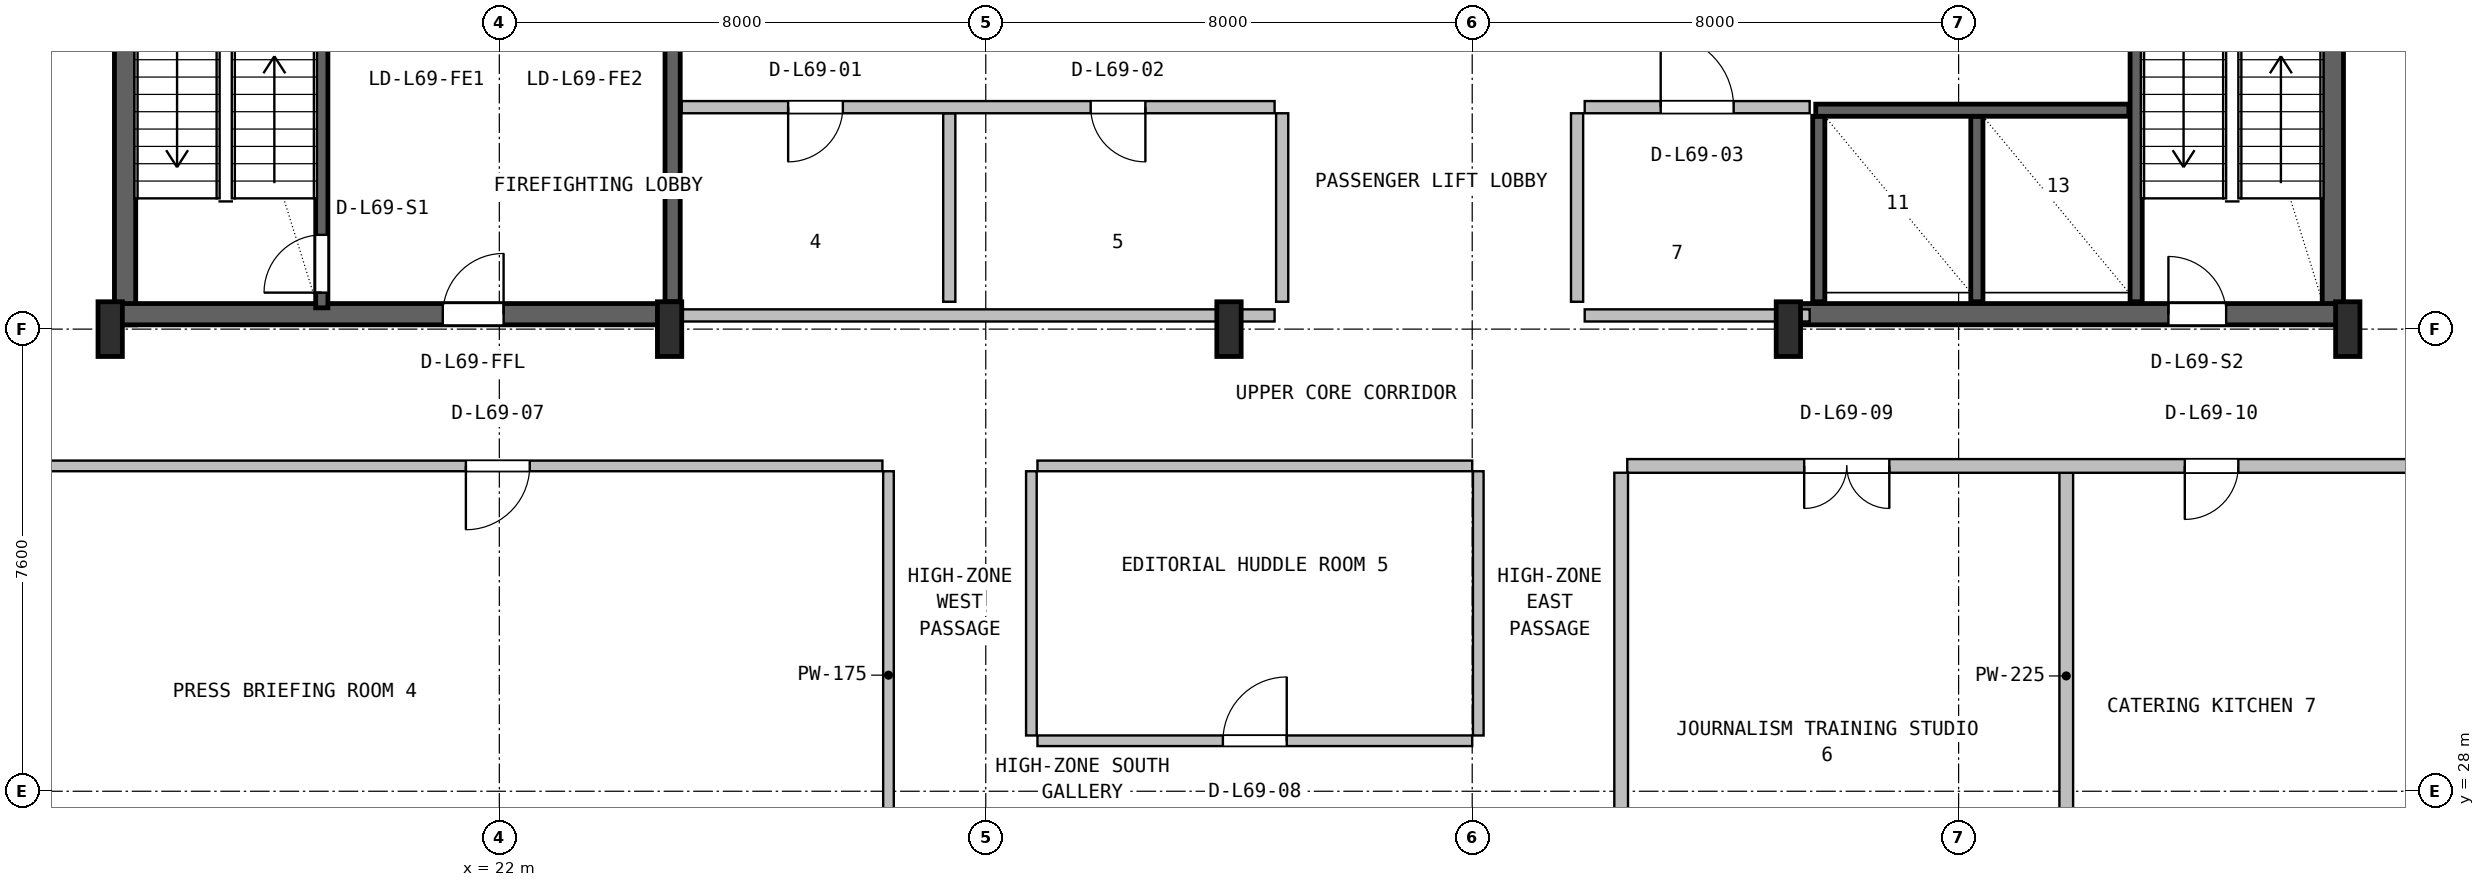
"""IFC4 building model, lengths in metres.
Left out: names, types, materials, properties, quantities, classifications, styles, units other than length and angle.
Written with IfcOpenShell. Run it as: python <this file> out.ifc"""

import sys

from ifc_helpers import new_model, si_unit, direction, frame, frame_2d, origin, origin_2d, place, context, subcontext, project, spatial, rectangle, i_section, extrude, source, transform, mapped, element, fill, save


model = new_model("IFC4")
c1 = context("Model", 3, precision=1e-05, world=origin(), true_north=direction((0.0, 1.0)))
c2 = subcontext(c1, "Body", "Model", "MODEL_VIEW")
j1 = project(units=[si_unit("LENGTHUNIT", "METRE"), si_unit("PLANEANGLEUNIT", "RADIAN")], contexts=[c1])
p1 = place(None, origin())
s1 = spatial("IfcSite", under=j1, at=p1, CompositionType="ELEMENT")
p2 = place(p1, origin())
s2 = spatial("IfcBuilding", under=s1, at=p2, CompositionType="ELEMENT")
p3 = place(p2, frame((0.0, 0.0, 277.4)))
s3 = spatial("IfcBuildingStorey", under=s2, at=p3, CompositionType="ELEMENT", Elevation=277.4)
for number, where, z_axis, x_axis in (
    (1, (15.845, 35.67, 0.0), (0.0, 0.0, 1.0), (0.0, 1.0, 0.0)),
    (2, (52.155, 35.67, 0.0), (0.0, 0.0, 1.0), (0.0, 1.0, 0.0)),
):
    element("IfcWall", number, at=place(p3, frame(where, z_axis=z_axis, x_axis=x_axis)), inside=s3, PredefinedType="SHEAR", context=c2, shape_type="SweptSolid", body=[
        extrude(rectangle(XDim=11.13, YDim=0.35, at=frame_2d((5.565, 0.0))), origin(), (0.0, 0.0, 1.0), 3.55),
    ])
p4 = place(p3, frame((15.67, 35.845, 0.0), z_axis=(0.0, 0.0, 1.0), x_axis=(1.0, 0.0, 0.0)))
e3 = element("IfcWall", 3, at=p4, inside=s3, PredefinedType="SHEAR", context=c2, shape_type="SweptSolid", body=[
    extrude(rectangle(XDim=9.13, YDim=0.35, at=frame_2d((4.565, 0.0))), origin(), (0.0, 0.0, 1.0), 3.55),
])
p5 = place(p4, frame((5.4, 0.0, 0.0)))
e4 = element("IfcOpeningElement", 4, at=p5, cuts=e3, PredefinedType="OPENING", context=c2, shape_type="SweptSolid", body=[
    extrude(rectangle(XDim=1.0, YDim=2.1, at=frame_2d((0.5, 1.05))), frame((0.0, 0.185, 0.0), z_axis=(0.0, -1.0, 0.0), x_axis=(1.0, 0.0, 0.0)), (0.0, 0.0, 1.0), 0.37),
])
p6 = place(p3, frame((43.2, 35.845, 0.0), z_axis=(0.0, 0.0, 1.0), x_axis=(1.0, 0.0, 0.0)))
e5 = element("IfcWall", 5, at=p6, inside=s3, PredefinedType="SHEAR", context=c2, shape_type="SweptSolid", body=[
    extrude(rectangle(XDim=9.13, YDim=0.35, at=frame_2d((4.565, 0.0))), origin(), (0.0, 0.0, 1.0), 3.55),
])
p7 = place(p6, frame((6.25, 0.0, 0.0)))
e6 = element("IfcOpeningElement", 6, at=p7, cuts=e5, PredefinedType="OPENING", context=c2, shape_type="SweptSolid", body=[
    extrude(rectangle(XDim=0.95, YDim=2.1, at=frame_2d((0.475, 1.05))), frame((0.0, 0.185, 0.0), z_axis=(0.0, -1.0, 0.0), x_axis=(1.0, 0.0, 0.0)), (0.0, 0.0, 1.0), 0.37),
])
m1 = source(origin(), c2, "Body", "SweptSolid", [
    extrude(i_section(OverallWidth=0.4, OverallDepth=0.9, WebThickness=0.016, FlangeThickness=0.028, FilletRadius=0.016, at=origin_2d()), origin(), (0.0, 0.0, 1.0), 3.8),
])
for number, where, z_axis, x_axis in (
    (7, (15.6, 35.6, 0.0), (0.0, 0.0, 1.0), (1.0, 0.0, 0.0)),
    (8, (24.8, 35.6, 0.0), (0.0, 0.0, 1.0), (1.0, 0.0, 0.0)),
    (9, (34.0, 35.6, 0.0), (0.0, 0.0, 1.0), (1.0, 0.0, 0.0)),
    (10, (43.2, 35.6, 0.0), (0.0, 0.0, 1.0), (1.0, 0.0, 0.0)),
    (11, (52.4, 35.6, 0.0), (0.0, 0.0, 1.0), (1.0, 0.0, 0.0)),
):
    element("IfcColumn", number, at=place(p3, frame(where, z_axis=z_axis, x_axis=x_axis)), inside=s3, PredefinedType="COLUMN", context=c2, shape_type="MappedRepresentation", body=[
        mapped(m1, transform((0.0, 0.0, 0.0), x_axis=(1.0, 0.0, 0.0), y_axis=(0.0, 1.0, 0.0), z_axis=(0.0, 0.0, 1.0), scale=1.0)),
    ])
p8 = place(p3, frame((19.08, 35.95, 0.0), z_axis=(0.0, 0.0, 1.0), x_axis=(0.0, 1.0, 0.0)))
e12 = element("IfcWall", 12, at=p8, inside=s3, PredefinedType="SHEAR", context=c2, shape_type="SweptSolid", body=[
    extrude(rectangle(XDim=9.65, YDim=0.2, at=frame_2d((4.825, 0.0))), origin(), (0.0, 0.0, 1.0), 3.55),
])
p9 = place(p8, frame((0.25, 0.0, 0.0)))
e13 = element("IfcOpeningElement", 13, at=p9, cuts=e12, PredefinedType="OPENING", context=c2, shape_type="SweptSolid", body=[
    extrude(rectangle(XDim=0.95, YDim=2.1, at=frame_2d((0.475, 1.05))), frame((0.0, 0.11, 0.0), z_axis=(0.0, -1.0, 0.0), x_axis=(1.0, 0.0, 0.0)), (0.0, 0.0, 1.0), 0.22),
])
p10 = place(p3, frame((24.85, 36.05, 0.0), z_axis=(0.0, 0.0, 1.0), x_axis=(0.0, 1.0, 0.0)))
e14 = element("IfcWall", 14, at=p10, inside=s3, PredefinedType="SHEAR", context=c2, shape_type="SweptSolid", body=[
    extrude(rectangle(XDim=10.45, YDim=0.25, at=frame_2d((5.225, 0.0))), origin(), (0.0, 0.0, 1.0), 3.55),
])
p11 = place(p3, frame((48.92, 36.05, 0.0), z_axis=(0.0, 0.0, 1.0), x_axis=(0.0, 1.0, 0.0)))
e15 = element("IfcWall", 15, at=p11, inside=s3, PredefinedType="SHEAR", context=c2, shape_type="SweptSolid", body=[
    extrude(rectangle(XDim=10.5, YDim=0.2, at=frame_2d((5.25, 0.0))), origin(), (0.0, 0.0, 1.0), 3.55),
])
for number, where, z_axis, x_axis in (
    (16, (43.7, 36.05, 0.0), (0.0, 0.0, 1.0), (0.0, 1.0, 0.0)),
    (17, (46.3, 36.05, 0.0), (0.0, 0.0, 1.0), (0.0, 1.0, 0.0)),
):
    element("IfcWall", number, at=place(p3, frame(where, z_axis=z_axis, x_axis=x_axis)), inside=s3, PredefinedType="SHEAR", context=c2, shape_type="SweptSolid", body=[
        extrude(rectangle(XDim=3.05, YDim=0.2, at=frame_2d((1.525, 0.0))), origin(), (0.0, 0.0, 1.0), 3.55),
    ])
p12 = place(p3, frame((43.65, 39.2, 0.0), z_axis=(0.0, 0.0, 1.0), x_axis=(1.0, 0.0, 0.0)))
e18 = element("IfcWall", 18, at=p12, inside=s3, PredefinedType="SHEAR", context=c2, shape_type="SweptSolid", body=[
    extrude(rectangle(XDim=5.15, YDim=0.2, at=frame_2d((2.575, 0.0))), origin(), (0.0, 0.0, 1.0), 3.55),
])
p13 = place(p3, frame((25.0, 35.825, 0.0), z_axis=(0.0, 0.0, 1.0), x_axis=(1.0, 0.0, 0.0)))
e19 = element("IfcWall", 19, at=p13, inside=s3, PredefinedType="PLUMBINGWALL", context=c2, shape_type="SweptSolid", body=[
    extrude(rectangle(XDim=9.75, YDim=0.2, at=frame_2d((4.875, 0.0))), origin(), (0.0, 0.0, 1.0), 2.575),
])
p14 = place(p3, frame((29.4, 36.05, 0.0), z_axis=(0.0, 0.0, 1.0), x_axis=(0.0, 1.0, 0.0)))
e20 = element("IfcWall", 20, at=p14, inside=s3, PredefinedType="PLUMBINGWALL", context=c2, shape_type="SweptSolid", body=[
    extrude(rectangle(XDim=3.1, YDim=0.2, at=frame_2d((1.55, 0.0))), origin(), (0.0, 0.0, 1.0), 3.53),
])
p15 = place(p3, frame((25.0, 39.25, 0.0), z_axis=(0.0, 0.0, 1.0), x_axis=(1.0, 0.0, 0.0)))
e21 = element("IfcWall", 21, at=p15, inside=s3, PredefinedType="PLUMBINGWALL", context=c2, shape_type="SweptSolid", body=[
    extrude(rectangle(XDim=9.75, YDim=0.2, at=frame_2d((4.875, 0.0))), origin(), (0.0, 0.0, 1.0), 3.53),
])
p16 = place(p15, frame((1.75, 0.0, 0.0)))
e22 = element("IfcOpeningElement", 22, at=p16, cuts=e21, PredefinedType="OPENING", context=c2, shape_type="SweptSolid", body=[
    extrude(rectangle(XDim=0.9, YDim=2.06, at=frame_2d((0.45, 1.03))), frame((0.0, 0.11, 0.0), z_axis=(0.0, -1.0, 0.0), x_axis=(1.0, 0.0, 0.0)), (0.0, 0.0, 1.0), 0.22),
])
p17 = place(p15, frame((6.725, 0.0, 0.0)))
e23 = element("IfcOpeningElement", 23, at=p17, cuts=e21, PredefinedType="OPENING", context=c2, shape_type="SweptSolid", body=[
    extrude(rectangle(XDim=0.9, YDim=2.06, at=frame_2d((0.45, 1.03))), frame((0.0, 0.11, 0.0), z_axis=(0.0, -1.0, 0.0), x_axis=(1.0, 0.0, 0.0)), (0.0, 0.0, 1.0), 0.22),
])
p18 = place(p3, frame((34.875, 36.05, 0.0), z_axis=(0.0, 0.0, 1.0), x_axis=(0.0, 1.0, 0.0)))
e24 = element("IfcWall", 24, at=p18, inside=s3, PredefinedType="PLUMBINGWALL", context=c2, shape_type="SweptSolid", body=[
    extrude(rectangle(XDim=3.1, YDim=0.2, at=frame_2d((1.55, 0.0))), origin(), (0.0, 0.0, 1.0), 3.53),
])
p19 = place(p3, frame((39.85, 35.825, 0.0), z_axis=(0.0, 0.0, 1.0), x_axis=(1.0, 0.0, 0.0)))
e25 = element("IfcWall", 25, at=p19, inside=s3, PredefinedType="SOLIDWALL", context=c2, shape_type="SweptSolid", body=[
    extrude(rectangle(XDim=3.7, YDim=0.2, at=frame_2d((1.85, 0.0))), origin(), (0.0, 0.0, 1.0), 2.575),
])
p20 = place(p3, frame((39.85, 39.25, 0.0), z_axis=(0.0, 0.0, 1.0), x_axis=(1.0, 0.0, 0.0)))
e26 = element("IfcWall", 26, at=p20, inside=s3, PredefinedType="SOLIDWALL", context=c2, shape_type="SweptSolid", body=[
    extrude(rectangle(XDim=3.7, YDim=0.2, at=frame_2d((1.85, 0.0))), origin(), (0.0, 0.0, 1.0), 3.53),
])
p21 = place(p20, frame((1.25, 0.0, 0.0)))
e27 = element("IfcOpeningElement", 27, at=p21, cuts=e26, PredefinedType="OPENING", context=c2, shape_type="SweptSolid", body=[
    extrude(rectangle(XDim=1.2, YDim=2.1, at=frame_2d((0.6, 1.05))), frame((0.0, 0.11, 0.0), z_axis=(0.0, -1.0, 0.0), x_axis=(1.0, 0.0, 0.0)), (0.0, 0.0, 1.0), 0.22),
])
p22 = place(p3, frame((39.725, 36.05, 0.0), z_axis=(0.0, 0.0, 1.0), x_axis=(0.0, 1.0, 0.0)))
e28 = element("IfcWall", 28, at=p22, inside=s3, PredefinedType="SOLIDWALL", context=c2, shape_type="SweptSolid", body=[
    extrude(rectangle(XDim=3.1, YDim=0.2, at=frame_2d((1.55, 0.0))), origin(), (0.0, 0.0, 1.0), 3.53),
])
p23 = place(p3, frame((28.4, 26.555, 0.0), z_axis=(0.0, 0.0, 1.0), x_axis=(0.0, 1.0, 0.0)))
e29 = element("IfcWall", 29, at=p23, inside=s3, PredefinedType="PARTITIONING", context=c2, shape_type="SweptSolid", body=[
    extrude(rectangle(XDim=6.708, YDim=0.175, at=frame_2d((3.354, 0.0))), origin(), (0.0, 0.0, 1.0), 3.53),
])
p24 = place(p3, frame((12.18, 33.35, 0.0), z_axis=(0.0, 0.0, 1.0), x_axis=(1.0, 0.0, 0.0)))
e30 = element("IfcWall", 30, at=p24, inside=s3, PredefinedType="PARTITIONING", context=c2, shape_type="SweptSolid", body=[
    extrude(rectangle(XDim=16.12, YDim=0.175, at=frame_2d((8.06, 0.0))), origin(), (0.0, 0.0, 1.0), 2.981),
])
p25 = place(p24, frame((9.27, 0.0, 0.0)))
e31 = element("IfcOpeningElement", 31, at=p25, cuts=e30, PredefinedType="OPENING", context=c2, shape_type="SweptSolid", body=[
    extrude(rectangle(XDim=1.05, YDim=2.1, at=frame_2d((0.525, 1.05))), frame((0.0, 0.098, 0.0), z_axis=(0.0, -1.0, 0.0), x_axis=(1.0, 0.0, 0.0)), (0.0, 0.0, 1.0), 0.195),
])
p26 = place(p3, frame((30.85, 28.83, 0.0), z_axis=(0.0, 0.0, 1.0), x_axis=(1.0, 0.0, 0.0)))
e32 = element("IfcWall", 32, at=p26, inside=s3, PredefinedType="PARTITIONING", context=c2, shape_type="SweptSolid", body=[
    extrude(rectangle(XDim=7.15, YDim=0.175, at=frame_2d((3.575, 0.0))), origin(), (0.0, 0.0, 1.0), 2.981),
])
p27 = place(p26, frame((3.05, 0.0, 0.0)))
e33 = element("IfcOpeningElement", 33, at=p27, cuts=e32, PredefinedType="OPENING", context=c2, shape_type="SweptSolid", body=[
    extrude(rectangle(XDim=1.05, YDim=2.1, at=frame_2d((0.525, 1.05))), frame((0.0, 0.098, 0.0), z_axis=(0.0, -1.0, 0.0), x_axis=(1.0, 0.0, 0.0)), (0.0, 0.0, 1.0), 0.195),
])
p28 = place(p3, frame((38.1, 28.917, 0.0), z_axis=(0.0, 0.0, 1.0), x_axis=(0.0, 1.0, 0.0)))
e34 = element("IfcWall", 34, at=p28, inside=s3, PredefinedType="PARTITIONING", context=c2, shape_type="SweptSolid", body=[
    extrude(rectangle(XDim=4.346, YDim=0.175, at=frame_2d((2.173, 0.0))), origin(), (0.0, 0.0, 1.0), 3.53),
])
p29 = place(p3, frame((30.85, 33.35, 0.0), z_axis=(0.0, 0.0, 1.0), x_axis=(1.0, 0.0, 0.0)))
e35 = element("IfcWall", 35, at=p29, inside=s3, PredefinedType="PARTITIONING", context=c2, shape_type="SweptSolid", body=[
    extrude(rectangle(XDim=7.15, YDim=0.175, at=frame_2d((3.575, 0.0))), origin(), (0.0, 0.0, 1.0), 2.981),
])
p30 = place(p3, frame((30.75, 28.917, 0.0), z_axis=(0.0, 0.0, 1.0), x_axis=(0.0, 1.0, 0.0)))
e36 = element("IfcWall", 36, at=p30, inside=s3, PredefinedType="PARTITIONING", context=c2, shape_type="SweptSolid", body=[
    extrude(rectangle(XDim=4.346, YDim=0.175, at=frame_2d((2.173, 0.0))), origin(), (0.0, 0.0, 1.0), 3.53),
])
p31 = place(p3, frame((47.77, 26.555, 0.0), z_axis=(0.0, 0.0, 1.0), x_axis=(0.0, 1.0, 0.0)))
e37 = element("IfcWall", 37, at=p31, inside=s3, PredefinedType="PARTITIONING", context=c2, shape_type="SweptSolid", body=[
    extrude(rectangle(XDim=6.683, YDim=0.225, at=frame_2d((3.342, 0.0))), origin(), (0.0, 0.0, 1.0), 3.53),
])
p32 = place(p3, frame((40.55, 33.35, 0.0), z_axis=(0.0, 0.0, 1.0), x_axis=(1.0, 0.0, 0.0)))
e38 = element("IfcWall", 38, at=p32, inside=s3, PredefinedType="PARTITIONING", context=c2, shape_type="SweptSolid", body=[
    extrude(rectangle(XDim=15.27, YDim=0.225, at=frame_2d((7.635, 0.0))), origin(), (0.0, 0.0, 1.0), 2.981),
])
p33 = place(p32, frame((2.91, 0.0, 0.0)))
e39 = element("IfcOpeningElement", 39, at=p33, cuts=e38, PredefinedType="OPENING", context=c2, shape_type="SweptSolid", body=[
    extrude(rectangle(XDim=1.4, YDim=2.12, at=frame_2d((0.7, 1.06))), frame((0.0, 0.123, 0.0), z_axis=(0.0, -1.0, 0.0), x_axis=(1.0, 0.0, 0.0)), (0.0, 0.0, 1.0), 0.245),
])
p34 = place(p32, frame((9.17, 0.0, 0.0)))
e40 = element("IfcOpeningElement", 40, at=p34, cuts=e38, PredefinedType="OPENING", context=c2, shape_type="SweptSolid", body=[
    extrude(rectangle(XDim=0.88, YDim=2.06, at=frame_2d((0.44, 1.03))), frame((0.0, 0.123, 0.0), z_axis=(0.0, -1.0, 0.0), x_axis=(1.0, 0.0, 0.0)), (0.0, 0.0, 1.0), 0.245),
])
p35 = place(p3, frame((40.45, 26.555, 0.0), z_axis=(0.0, 0.0, 1.0), x_axis=(0.0, 1.0, 0.0)))
e41 = element("IfcWall", 41, at=p35, inside=s3, PredefinedType="PARTITIONING", context=c2, shape_type="SweptSolid", body=[
    extrude(rectangle(XDim=6.683, YDim=0.225, at=frame_2d((3.342, 0.0))), origin(), (0.0, 0.0, 1.0), 3.53),
])
m2 = source(origin(), c2, "Body", "SweptSolid", [
    extrude(rectangle(XDim=0.95, YDim=2.1, at=frame_2d((0.475, 1.05))), frame((0.0, 0.025, 0.0), z_axis=(0.0, -1.0, 0.0), x_axis=(1.0, 0.0, 0.0)), (0.0, 0.0, 1.0), 0.05),
])
p36 = place(p9, origin())
e42 = element("IfcDoor", 42, at=p36, inside=s3, OperationType="SINGLE_SWING_LEFT", PredefinedType="DOOR", context=c2, shape_type="MappedRepresentation", body=[
    mapped(m2, transform((0.0, 0.0, 0.0), x_axis=(1.0, 0.0, 0.0), y_axis=(0.0, 1.0, 0.0), z_axis=(0.0, 0.0, 1.0), scale=1.0)),
])
fill(e13, e42)
m3 = source(origin(), c2, "Body", "SweptSolid", [
    extrude(rectangle(XDim=1.0, YDim=2.1, at=frame_2d((0.5, 1.05))), frame((0.0, 0.025, 0.0), z_axis=(0.0, -1.0, 0.0), x_axis=(1.0, 0.0, 0.0)), (0.0, 0.0, 1.0), 0.05),
])
p37 = place(p5, origin())
e43 = element("IfcDoor", 43, at=p37, inside=s3, OperationType="SINGLE_SWING_RIGHT", PredefinedType="DOOR", context=c2, shape_type="MappedRepresentation", body=[
    mapped(m3, transform((0.0, 0.0, 0.0), x_axis=(1.0, 0.0, 0.0), y_axis=(0.0, 1.0, 0.0), z_axis=(0.0, 0.0, 1.0), scale=1.0)),
])
fill(e4, e43)
p38 = place(p7, origin())
e44 = element("IfcDoor", 44, at=p38, inside=s3, OperationType="SINGLE_SWING_LEFT", PredefinedType="DOOR", context=c2, shape_type="MappedRepresentation", body=[
    mapped(m2, transform((0.0, 0.0, 0.0), x_axis=(1.0, 0.0, 0.0), y_axis=(0.0, 1.0, 0.0), z_axis=(0.0, 0.0, 1.0), scale=1.0)),
])
fill(e6, e44)
m4 = source(origin(), c2, "Body", "SweptSolid", [
    extrude(rectangle(XDim=0.9, YDim=2.06, at=frame_2d((0.45, 1.03))), frame((0.0, 0.025, 0.0), z_axis=(0.0, -1.0, 0.0), x_axis=(1.0, 0.0, 0.0)), (0.0, 0.0, 1.0), 0.05),
])
p39 = place(p16, frame((0.9, 0.0, 0.0), z_axis=(0.0, 0.0, 1.0), x_axis=(-1.0, 0.0, 0.0)))
e45 = element("IfcDoor", 45, at=p39, inside=s3, OperationType="SINGLE_SWING_LEFT", PredefinedType="DOOR", context=c2, shape_type="MappedRepresentation", body=[
    mapped(m4, transform((0.0, 0.0, 0.0), x_axis=(1.0, 0.0, 0.0), y_axis=(0.0, 1.0, 0.0), z_axis=(0.0, 0.0, 1.0), scale=1.0)),
])
fill(e22, e45)
p40 = place(p17, frame((0.9, 0.0, 0.0), z_axis=(0.0, 0.0, 1.0), x_axis=(-1.0, 0.0, 0.0)))
e46 = element("IfcDoor", 46, at=p40, inside=s3, OperationType="SINGLE_SWING_RIGHT", PredefinedType="DOOR", context=c2, shape_type="MappedRepresentation", body=[
    mapped(m4, transform((0.0, 0.0, 0.0), x_axis=(1.0, 0.0, 0.0), y_axis=(0.0, 1.0, 0.0), z_axis=(0.0, 0.0, 1.0), scale=1.0)),
])
fill(e23, e46)
m5 = source(origin(), c2, "Body", "SweptSolid", [
    extrude(rectangle(XDim=1.2, YDim=2.1, at=frame_2d((0.6, 1.05))), frame((0.0, 0.025, 0.0), z_axis=(0.0, -1.0, 0.0), x_axis=(1.0, 0.0, 0.0)), (0.0, 0.0, 1.0), 0.05),
])
p41 = place(p21, origin())
e47 = element("IfcDoor", 47, at=p41, inside=s3, OperationType="SINGLE_SWING_LEFT", PredefinedType="DOOR", context=c2, shape_type="MappedRepresentation", body=[
    mapped(m5, transform((0.0, 0.0, 0.0), x_axis=(1.0, 0.0, 0.0), y_axis=(0.0, 1.0, 0.0), z_axis=(0.0, 0.0, 1.0), scale=1.0)),
])
fill(e27, e47)
m6 = source(origin(), c2, "Body", "SweptSolid", [
    extrude(rectangle(XDim=1.05, YDim=2.1, at=frame_2d((0.525, 1.05))), frame((0.0, 0.025, 0.0), z_axis=(0.0, -1.0, 0.0), x_axis=(1.0, 0.0, 0.0)), (0.0, 0.0, 1.0), 0.05),
])
p42 = place(p25, frame((1.05, 0.0, 0.0), z_axis=(0.0, 0.0, 1.0), x_axis=(-1.0, 0.0, 0.0)))
e48 = element("IfcDoor", 48, at=p42, inside=s3, OperationType="SINGLE_SWING_LEFT", PredefinedType="DOOR", context=c2, shape_type="MappedRepresentation", body=[
    mapped(m6, transform((0.0, 0.0, 0.0), x_axis=(1.0, 0.0, 0.0), y_axis=(0.0, 1.0, 0.0), z_axis=(0.0, 0.0, 1.0), scale=1.0)),
])
fill(e31, e48)
p43 = place(p27, origin())
e49 = element("IfcDoor", 49, at=p43, inside=s3, OperationType="SINGLE_SWING_RIGHT", PredefinedType="DOOR", context=c2, shape_type="MappedRepresentation", body=[
    mapped(m6, transform((0.0, 0.0, 0.0), x_axis=(1.0, 0.0, 0.0), y_axis=(0.0, 1.0, 0.0), z_axis=(0.0, 0.0, 1.0), scale=1.0)),
])
fill(e33, e49)
m7 = source(origin(), c2, "Body", "SweptSolid", [
    extrude(rectangle(XDim=1.4, YDim=2.12, at=frame_2d((0.7, 1.06))), frame((0.0, 0.025, 0.0), z_axis=(0.0, -1.0, 0.0), x_axis=(1.0, 0.0, 0.0)), (0.0, 0.0, 1.0), 0.05),
])
p44 = place(p33, frame((1.4, 0.0, 0.0), z_axis=(0.0, 0.0, 1.0), x_axis=(-1.0, 0.0, 0.0)))
e50 = element("IfcDoor", 50, at=p44, inside=s3, OperationType="DOUBLE_DOOR_SINGLE_SWING", PredefinedType="DOOR", context=c2, shape_type="MappedRepresentation", body=[
    mapped(m7, transform((0.0, 0.0, 0.0), x_axis=(1.0, 0.0, 0.0), y_axis=(0.0, 1.0, 0.0), z_axis=(0.0, 0.0, 1.0), scale=1.0)),
])
fill(e39, e50)
m8 = source(origin(), c2, "Body", "SweptSolid", [
    extrude(rectangle(XDim=0.88, YDim=2.06, at=frame_2d((0.44, 1.03))), frame((0.0, 0.025, 0.0), z_axis=(0.0, -1.0, 0.0), x_axis=(1.0, 0.0, 0.0)), (0.0, 0.0, 1.0), 0.05),
])
p45 = place(p34, frame((0.88, 0.0, 0.0), z_axis=(0.0, 0.0, 1.0), x_axis=(-1.0, 0.0, 0.0)))
e51 = element("IfcDoor", 51, at=p45, inside=s3, OperationType="SINGLE_SWING_LEFT", PredefinedType="DOOR", context=c2, shape_type="MappedRepresentation", body=[
    mapped(m8, transform((0.0, 0.0, 0.0), x_axis=(1.0, 0.0, 0.0), y_axis=(0.0, 1.0, 0.0), z_axis=(0.0, 0.0, 1.0), scale=1.0)),
])
fill(e40, e51)
save(model, sys.argv[1])
